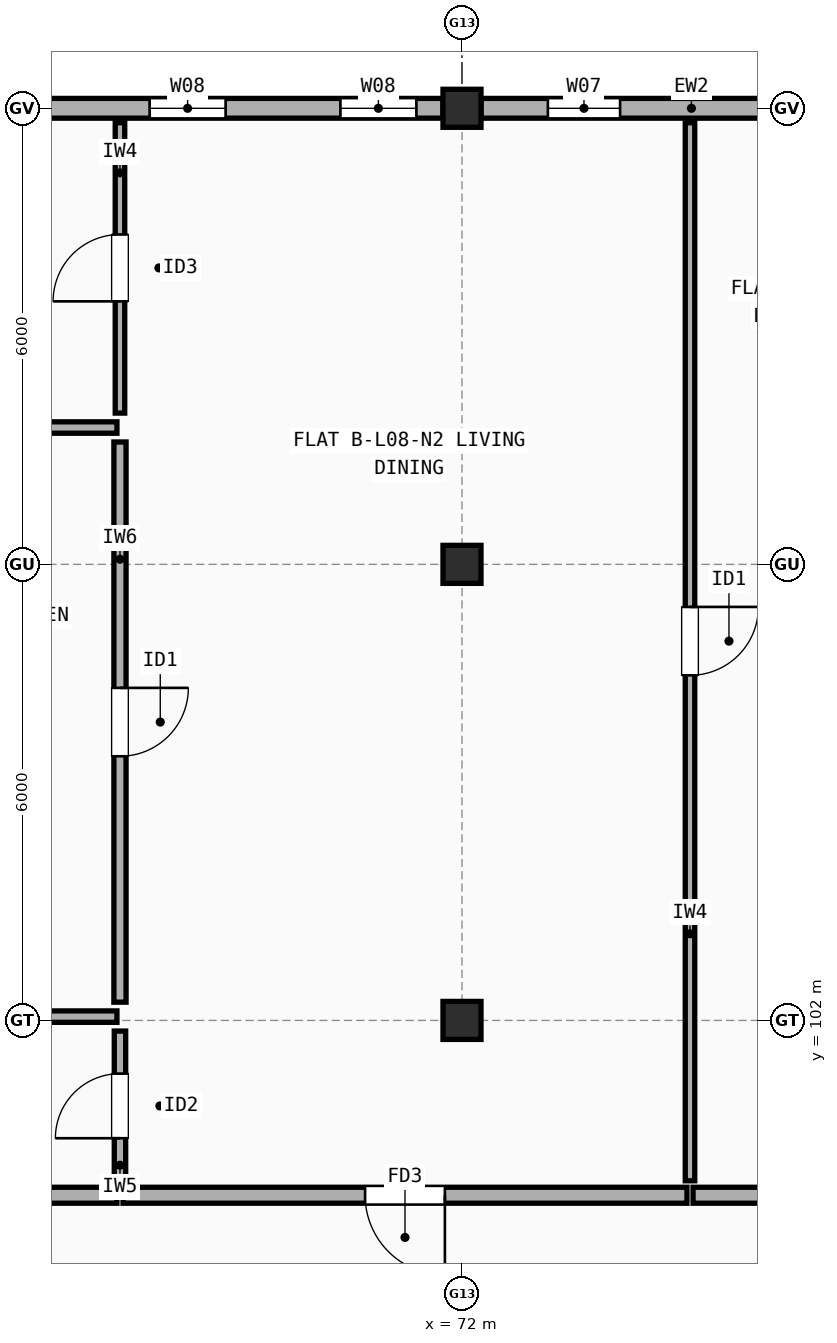
"""IFC4 building model, lengths in metres.
Left out: names, types, materials, properties, quantities, classifications, styles, units other than length and angle.
Written with IfcOpenShell. Run it as: python <this file> out.ifc"""

import sys

from ifc_helpers import new_model, si_unit, direction, frame, frame_2d, origin, origin_2d, place, context, subcontext, project, spatial, rectangle, extrude, element, fill, save


model = new_model("IFC4")
c1 = context("Model", 3, precision=1e-05, world=origin(), true_north=direction((0.0, 1.0)))
c2 = subcontext(c1, "Body", "Model", "MODEL_VIEW")
j1 = project(units=[si_unit("LENGTHUNIT", "METRE"), si_unit("PLANEANGLEUNIT", "RADIAN")], contexts=[c1])
p1 = place(None, origin())
s1 = spatial("IfcSite", under=j1, at=p1, CompositionType="ELEMENT")
p2 = place(p1, origin())
s2 = spatial("IfcBuilding", under=s1, at=p2, CompositionType="ELEMENT")
p3 = place(p2, frame((0.0, 0.0, 26.9)))
s3 = spatial("IfcBuildingStorey", under=s2, at=p3, CompositionType="ELEMENT", Elevation=26.9)
for number, where, z_axis, x_axis in (
    (1, (72.0, 102.0, 0.0), (0.0, 0.0, 1.0), (1.0, 0.0, 0.0)),
    (2, (72.0, 108.0, 0.0), (0.0, 0.0, 1.0), (1.0, 0.0, 0.0)),
    (3, (72.0, 114.0, 0.0), (0.0, 0.0, 1.0), (1.0, 0.0, 0.0)),
):
    element("IfcColumn", number, at=place(p3, frame(where, z_axis=z_axis, x_axis=x_axis)), inside=s3, PredefinedType="COLUMN", context=c2, shape_type="SweptSolid", body=[
        extrude(rectangle(XDim=0.5, YDim=0.5, at=origin_2d()), origin(), (0.0, 0.0, 1.0), 2.98),
    ])
p4 = place(p3, frame((77.775, 114.0, 0.0), z_axis=(0.0, 0.0, 1.0), x_axis=(-1.0, 0.0, 0.0)))
e4 = element("IfcWall", 4, at=p4, inside=s3, PredefinedType="STANDARD", context=c2, shape_type="SweptSolid", body=[
    extrude(rectangle(XDim=5.525, YDim=0.26, at=frame_2d((2.762, 0.0))), origin(), (0.0, 0.0, 1.0), 2.462),
])
p5 = place(p4, frame((0.917, 0.0, 0.9)))
e5 = element("IfcOpeningElement", 5, at=p5, cuts=e4, PredefinedType="OPENING", context=c2, shape_type="SweptSolid", body=[
    extrude(rectangle(XDim=0.9, YDim=1.4, at=frame_2d((0.45, 0.7))), frame((0.0, 0.14, 0.0), z_axis=(0.0, -1.0, 0.0), x_axis=(1.0, 0.0, 0.0)), (0.0, 0.0, 1.0), 0.28),
])
p6 = place(p4, frame((3.695, 0.0, 0.9)))
e6 = element("IfcOpeningElement", 6, at=p6, cuts=e4, PredefinedType="OPENING", context=c2, shape_type="SweptSolid", body=[
    extrude(rectangle(XDim=0.95, YDim=1.35, at=frame_2d((0.475, 0.675))), frame((0.0, 0.14, 0.0), z_axis=(0.0, -1.0, 0.0), x_axis=(1.0, 0.0, 0.0)), (0.0, 0.0, 1.0), 0.28),
])
p7 = place(p3, frame((71.75, 114.0, 0.0), z_axis=(0.0, 0.0, 1.0), x_axis=(-1.0, 0.0, 0.0)))
e7 = element("IfcWall", 7, at=p7, inside=s3, PredefinedType="STANDARD", context=c2, shape_type="SweptSolid", body=[
    extrude(rectangle(XDim=5.5, YDim=0.26, at=frame_2d((2.75, 0.0))), origin(), (0.0, 0.0, 1.0), 2.462),
])
p8 = place(p7, frame((0.35, 0.0, 0.9)))
e8 = element("IfcOpeningElement", 8, at=p8, cuts=e7, PredefinedType="OPENING", context=c2, shape_type="SweptSolid", body=[
    extrude(rectangle(XDim=1.0, YDim=1.4, at=frame_2d((0.5, 0.7))), frame((0.0, 0.14, 0.0), z_axis=(0.0, -1.0, 0.0), x_axis=(1.0, 0.0, 0.0)), (0.0, 0.0, 1.0), 0.28),
])
p9 = place(p7, frame((2.86, 0.0, 0.9)))
e9 = element("IfcOpeningElement", 9, at=p9, cuts=e7, PredefinedType="OPENING", context=c2, shape_type="SweptSolid", body=[
    extrude(rectangle(XDim=1.0, YDim=1.4, at=frame_2d((0.5, 0.7))), frame((0.0, 0.14, 0.0), z_axis=(0.0, -1.0, 0.0), x_axis=(1.0, 0.0, 0.0)), (0.0, 0.0, 1.0), 0.28),
])
p10 = place(p3, frame((63.04, 99.7, 0.0), z_axis=(0.0, 0.0, 1.0), x_axis=(1.0, 0.0, 0.0)))
e10 = element("IfcWall", 10, at=p10, inside=s3, PredefinedType="SOLIDWALL", context=c2, shape_type="SweptSolid", body=[
    extrude(rectangle(XDim=4.42, YDim=0.21, at=frame_2d((2.21, 0.0))), origin(), (0.0, 0.0, 1.0), 2.98),
])
p11 = place(p3, frame((67.54, 99.7, 0.0), z_axis=(0.0, 0.0, 1.0), x_axis=(1.0, 0.0, 0.0)))
e11 = element("IfcWall", 11, at=p11, inside=s3, PredefinedType="SOLIDWALL", context=c2, shape_type="SweptSolid", body=[
    extrude(rectangle(XDim=7.42, YDim=0.21, at=frame_2d((3.71, 0.0))), origin(), (0.0, 0.0, 1.0), 2.98),
])
p12 = place(p11, frame((3.185, 0.0, 0.0)))
e12 = element("IfcOpeningElement", 12, at=p12, cuts=e11, PredefinedType="OPENING", context=c2, shape_type="SweptSolid", body=[
    extrude(rectangle(XDim=1.05, YDim=2.15, at=frame_2d((0.525, 1.075))), frame((0.0, 0.115, 0.0), z_axis=(0.0, -1.0, 0.0), x_axis=(1.0, 0.0, 0.0)), (0.0, 0.0, 1.0), 0.23),
])
p13 = place(p3, frame((67.5, 109.99, 0.0), z_axis=(0.0, 0.0, 1.0), x_axis=(0.0, 1.0, 0.0)))
e13 = element("IfcWall", 13, at=p13, inside=s3, PredefinedType="PARTITIONING", context=c2, shape_type="SweptSolid", body=[
    extrude(rectangle(XDim=3.82, YDim=0.125, at=frame_2d((1.91, 0.0))), origin(), (0.0, 0.0, 1.0), 2.98),
])
p14 = place(p13, frame((1.47, 0.0, 0.0)))
e14 = element("IfcOpeningElement", 14, at=p14, cuts=e13, PredefinedType="OPENING", context=c2, shape_type="SweptSolid", body=[
    extrude(rectangle(XDim=0.88, YDim=2.1, at=frame_2d((0.44, 1.05))), frame((0.0, 0.073, 0.0), z_axis=(0.0, -1.0, 0.0), x_axis=(1.0, 0.0, 0.0)), (0.0, 0.0, 1.0), 0.145),
])
p15 = place(p3, frame((67.5, 102.24, 0.0), z_axis=(0.0, 0.0, 1.0), x_axis=(0.0, 1.0, 0.0)))
e15 = element("IfcWall", 15, at=p15, inside=s3, PredefinedType="PLUMBINGWALL", context=c2, shape_type="SweptSolid", body=[
    extrude(rectangle(XDim=7.37, YDim=0.16, at=frame_2d((3.685, 0.0))), origin(), (0.0, 0.0, 1.0), 2.462),
])
p16 = place(p15, frame((3.235, 0.0, 0.0)))
e16 = element("IfcOpeningElement", 16, at=p16, cuts=e15, PredefinedType="OPENING", context=c2, shape_type="SweptSolid", body=[
    extrude(rectangle(XDim=0.9, YDim=2.1, at=frame_2d((0.45, 1.05))), frame((0.0, 0.09, 0.0), z_axis=(0.0, -1.0, 0.0), x_axis=(1.0, 0.0, 0.0)), (0.0, 0.0, 1.0), 0.18),
])
p17 = place(p3, frame((67.5, 99.89, 0.0), z_axis=(0.0, 0.0, 1.0), x_axis=(0.0, 1.0, 0.0)))
e17 = element("IfcWall", 17, at=p17, inside=s3, PredefinedType="PARTITIONING", context=c2, shape_type="SweptSolid", body=[
    extrude(rectangle(XDim=1.97, YDim=0.15, at=frame_2d((0.985, 0.0))), origin(), (0.0, 0.0, 1.0), 2.98),
])
p18 = place(p17, frame((0.56, 0.0, 0.0)))
e18 = element("IfcOpeningElement", 18, at=p18, cuts=e17, PredefinedType="OPENING", context=c2, shape_type="SweptSolid", body=[
    extrude(rectangle(XDim=0.85, YDim=2.1, at=frame_2d((0.425, 1.05))), frame((0.0, 0.085, 0.0), z_axis=(0.0, -1.0, 0.0), x_axis=(1.0, 0.0, 0.0)), (0.0, 0.0, 1.0), 0.17),
])
p19 = place(p3, frame((63.04, 109.8, 0.0), z_axis=(0.0, 0.0, 1.0), x_axis=(1.0, 0.0, 0.0)))
e19 = element("IfcWall", 19, at=p19, inside=s3, PredefinedType="PARTITIONING", context=c2, shape_type="SweptSolid", body=[
    extrude(rectangle(XDim=4.42, YDim=0.15, at=frame_2d((2.21, 0.0))), origin(), (0.0, 0.0, 1.0), 2.548),
])
p20 = place(p3, frame((63.04, 102.05, 0.0), z_axis=(0.0, 0.0, 1.0), x_axis=(1.0, 0.0, 0.0)))
e20 = element("IfcWall", 20, at=p20, inside=s3, PredefinedType="PARTITIONING", context=c2, shape_type="SweptSolid", body=[
    extrude(rectangle(XDim=4.42, YDim=0.15, at=frame_2d((2.21, 0.0))), origin(), (0.0, 0.0, 1.0), 2.462),
])
p21 = place(p3, frame((75.04, 99.7, 0.0), z_axis=(0.0, 0.0, 1.0), x_axis=(1.0, 0.0, 0.0)))
e21 = element("IfcWall", 21, at=p21, inside=s3, PredefinedType="SOLIDWALL", context=c2, shape_type="SweptSolid", body=[
    extrude(rectangle(XDim=2.92, YDim=0.21, at=frame_2d((1.46, 0.0))), origin(), (0.0, 0.0, 1.0), 2.462),
])
p22 = place(p3, frame((75.0, 99.89, 0.0), z_axis=(0.0, 0.0, 1.0), x_axis=(0.0, 1.0, 0.0)))
e22 = element("IfcWall", 22, at=p22, inside=s3, PredefinedType="PARTITIONING", context=c2, shape_type="SweptSolid", body=[
    extrude(rectangle(XDim=13.92, YDim=0.125, at=frame_2d((6.96, 0.0))), origin(), (0.0, 0.0, 1.0), 2.462),
])
p23 = place(p22, frame((6.65, 0.0, 0.0)))
e23 = element("IfcOpeningElement", 23, at=p23, cuts=e22, PredefinedType="OPENING", context=c2, shape_type="SweptSolid", body=[
    extrude(rectangle(XDim=0.9, YDim=2.1, at=frame_2d((0.45, 1.05))), frame((0.0, 0.073, 0.0), z_axis=(0.0, -1.0, 0.0), x_axis=(1.0, 0.0, 0.0)), (0.0, 0.0, 1.0), 0.145),
])
p24 = place(p6, origin())
e24 = element("IfcWindow", 24, at=p24, inside=s3, PartitioningType="SINGLE_PANEL", PredefinedType="WINDOW", context=c2, shape_type="SweptSolid", body=[
    extrude(rectangle(XDim=0.95, YDim=1.35, at=frame_2d((0.475, 0.675))), frame((0.0, 0.03, 0.0), z_axis=(0.0, -1.0, 0.0), x_axis=(1.0, 0.0, 0.0)), (0.0, 0.0, 1.0), 0.06),
])
fill(e6, e24)
p25 = place(p8, origin())
e25 = element("IfcWindow", 25, at=p25, inside=s3, PartitioningType="SINGLE_PANEL", PredefinedType="WINDOW", context=c2, shape_type="SweptSolid", body=[
    extrude(rectangle(XDim=1.0, YDim=1.4, at=frame_2d((0.5, 0.7))), frame((0.0, 0.03, 0.0), z_axis=(0.0, -1.0, 0.0), x_axis=(1.0, 0.0, 0.0)), (0.0, 0.0, 1.0), 0.06),
])
fill(e8, e25)
p26 = place(p9, origin())
e26 = element("IfcWindow", 26, at=p26, inside=s3, PartitioningType="SINGLE_PANEL", PredefinedType="WINDOW", context=c2, shape_type="SweptSolid", body=[
    extrude(rectangle(XDim=1.0, YDim=1.4, at=frame_2d((0.5, 0.7))), frame((0.0, 0.03, 0.0), z_axis=(0.0, -1.0, 0.0), x_axis=(1.0, 0.0, 0.0)), (0.0, 0.0, 1.0), 0.06),
])
fill(e9, e26)
p27 = place(p12, origin())
e27 = element("IfcDoor", 27, at=p27, inside=s3, OperationType="SINGLE_SWING_RIGHT", PredefinedType="DOOR", context=c2, shape_type="SweptSolid", body=[
    extrude(rectangle(XDim=1.05, YDim=2.15, at=frame_2d((0.525, 1.075))), frame((0.0, 0.025, 0.0), z_axis=(0.0, -1.0, 0.0), x_axis=(1.0, 0.0, 0.0)), (0.0, 0.0, 1.0), 0.05),
])
fill(e12, e27)
p28 = place(p14, origin())
e28 = element("IfcDoor", 28, at=p28, inside=s3, OperationType="SINGLE_SWING_LEFT", PredefinedType="DOOR", context=c2, shape_type="SweptSolid", body=[
    extrude(rectangle(XDim=0.88, YDim=2.1, at=frame_2d((0.44, 1.05))), frame((0.0, 0.025, 0.0), z_axis=(0.0, -1.0, 0.0), x_axis=(1.0, 0.0, 0.0)), (0.0, 0.0, 1.0), 0.05),
])
fill(e14, e28)
p29 = place(p16, origin())
e29 = element("IfcDoor", 29, at=p29, inside=s3, OperationType="SINGLE_SWING_RIGHT", PredefinedType="DOOR", context=c2, shape_type="SweptSolid", body=[
    extrude(rectangle(XDim=0.9, YDim=2.1, at=frame_2d((0.45, 1.05))), frame((0.0, 0.025, 0.0), z_axis=(0.0, -1.0, 0.0), x_axis=(1.0, 0.0, 0.0)), (0.0, 0.0, 1.0), 0.05),
])
fill(e16, e29)
p30 = place(p18, origin())
e30 = element("IfcDoor", 30, at=p30, inside=s3, OperationType="SINGLE_SWING_LEFT", PredefinedType="DOOR", context=c2, shape_type="SweptSolid", body=[
    extrude(rectangle(XDim=0.85, YDim=2.1, at=frame_2d((0.425, 1.05))), frame((0.0, 0.025, 0.0), z_axis=(0.0, -1.0, 0.0), x_axis=(1.0, 0.0, 0.0)), (0.0, 0.0, 1.0), 0.05),
])
fill(e18, e30)
p31 = place(p23, origin())
e31 = element("IfcDoor", 31, at=p31, inside=s3, OperationType="SINGLE_SWING_RIGHT", PredefinedType="DOOR", context=c2, shape_type="SweptSolid", body=[
    extrude(rectangle(XDim=0.9, YDim=2.1, at=frame_2d((0.45, 1.05))), frame((0.0, 0.025, 0.0), z_axis=(0.0, -1.0, 0.0), x_axis=(1.0, 0.0, 0.0)), (0.0, 0.0, 1.0), 0.05),
])
fill(e23, e31)
save(model, sys.argv[1])
